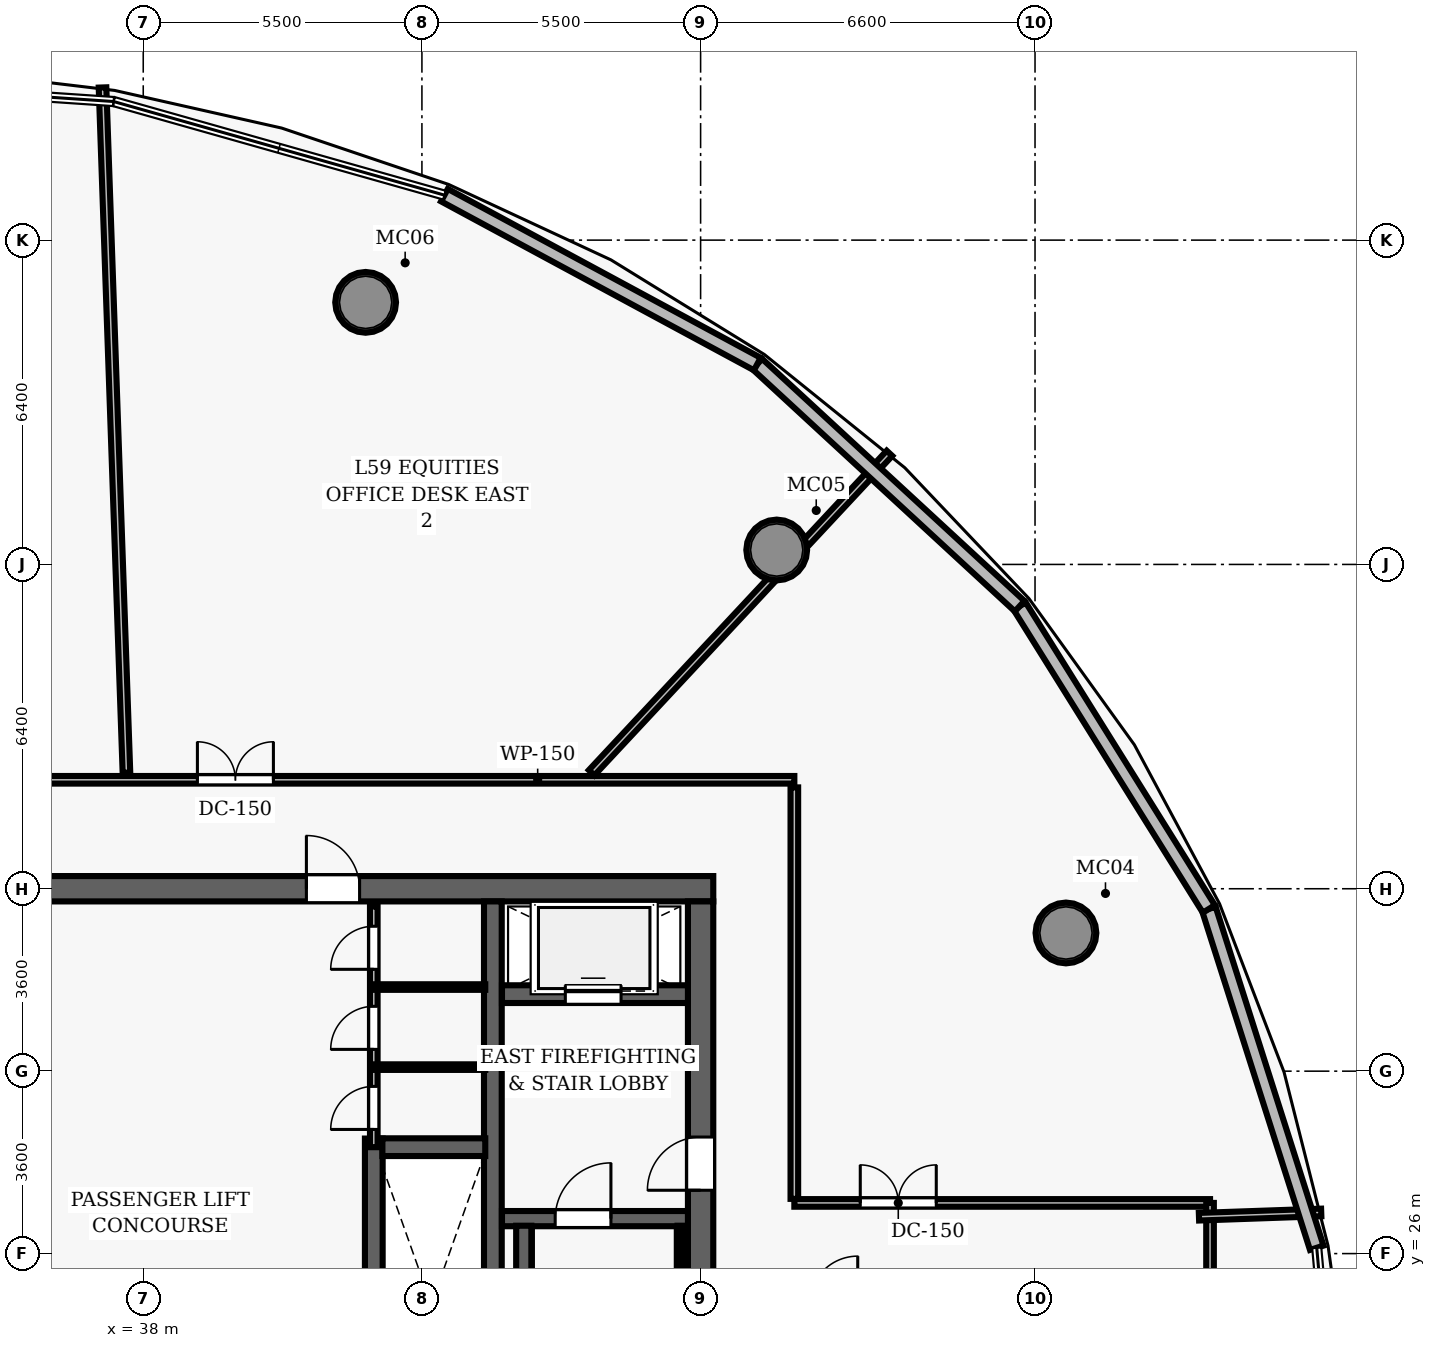
"""IFC4 building model, lengths in metres.
Left out: names, types, materials, properties, quantities, classifications, styles, units other than length and angle.
Written with IfcOpenShell. Run it as: python <this file> out.ifc"""

import sys

from ifc_helpers import new_model, si_unit, direction, frame, frame_2d, origin, origin_2d, place, context, subcontext, project, spatial, rectangle, hollow_circle, extrude, element, fill, save


model = new_model("IFC4")
c1 = context("Model", 3, precision=1e-05, world=origin(), true_north=direction((0.0, 1.0)))
c2 = subcontext(c1, "Body", "Model", "MODEL_VIEW")
j1 = project(units=[si_unit("LENGTHUNIT", "METRE"), si_unit("PLANEANGLEUNIT", "RADIAN")], contexts=[c1])
p1 = place(None, origin())
s1 = spatial("IfcSite", under=j1, at=p1, CompositionType="ELEMENT")
p2 = place(p1, origin())
s2 = spatial("IfcBuilding", under=s1, at=p2, CompositionType="ELEMENT")
p3 = place(p2, frame((0.0, 0.0, 232.8)))
s3 = spatial("IfcBuildingStorey", under=s2, at=p3, CompositionType="ELEMENT", Elevation=232.8)
p4 = place(p3, frame((26.75, 33.2, 0.0), z_axis=(0.0, 0.0, 1.0), x_axis=(1.0, 0.0, 0.0)))
e1 = element("IfcWall", 1, at=p4, inside=s3, PredefinedType="SHEAR", context=c2, shape_type="SweptSolid", body=[
    extrude(rectangle(XDim=22.5, YDim=0.5, at=frame_2d((11.25, 0.0))), origin(), (0.0, 0.0, 1.0), 3.85),
])
p5 = place(p4, frame((4.57, 0.0, 0.0)))
e2 = element("IfcOpeningElement", 2, at=p5, cuts=e1, PredefinedType="OPENING", context=c2, shape_type="SweptSolid", body=[
    extrude(rectangle(XDim=1.05, YDim=2.15, at=frame_2d((0.525, 1.075))), frame((0.0, 0.26, 0.0), z_axis=(0.0, -1.0, 0.0), x_axis=(1.0, 0.0, 0.0)), (0.0, 0.0, 1.0), 0.52),
])
p6 = place(p4, frame((14.47, 0.0, 0.0)))
e3 = element("IfcOpeningElement", 3, at=p6, cuts=e1, PredefinedType="OPENING", context=c2, shape_type="SweptSolid", body=[
    extrude(rectangle(XDim=1.05, YDim=2.15, at=frame_2d((0.525, 1.075))), frame((0.0, 0.26, 0.0), z_axis=(0.0, -1.0, 0.0), x_axis=(1.0, 0.0, 0.0)), (0.0, 0.0, 1.0), 0.52),
])
p7 = place(p3, frame((49.0, 19.05, 0.0), z_axis=(0.0, 0.0, 1.0), x_axis=(0.0, 1.0, 0.0)))
e4 = element("IfcWall", 4, at=p7, inside=s3, PredefinedType="SHEAR", context=c2, shape_type="SweptSolid", body=[
    extrude(rectangle(XDim=13.9, YDim=0.5, at=frame_2d((6.95, 0.0))), origin(), (0.0, 0.0, 1.0), 3.85),
])
p8 = place(p7, frame((8.2, 0.0, 0.0)))
e5 = element("IfcOpeningElement", 5, at=p8, cuts=e4, PredefinedType="OPENING", context=c2, shape_type="SweptSolid", body=[
    extrude(rectangle(XDim=1.05, YDim=2.15, at=frame_2d((0.525, 1.075))), frame((0.0, 0.26, 0.0), z_axis=(0.0, -1.0, 0.0), x_axis=(1.0, 0.0, 0.0)), (0.0, 0.0, 1.0), 0.52),
])
p9 = place(p3, frame((44.9, 19.05, 0.0), z_axis=(0.0, 0.0, 1.0), x_axis=(0.0, 1.0, 0.0)))
e6 = element("IfcWall", 6, at=p9, inside=s3, PredefinedType="SHEAR", context=c2, shape_type="SweptSolid", body=[
    extrude(rectangle(XDim=13.9, YDim=0.35, at=frame_2d((6.95, 0.0))), origin(), (0.0, 0.0, 1.0), 3.85),
])
for number, where, z_axis, x_axis in (
    (7, (56.21, 32.327, 0.0), (0.0, 0.0, 1.0), (1.0, 0.0, 0.0)),
    (8, (50.502, 39.885, 0.0), (0.0, 0.0, 1.0), (1.0, 0.0, 0.0)),
    (9, (42.389, 44.772, 0.0), (0.0, 0.0, 1.0), (1.0, 0.0, 0.0)),
):
    element("IfcColumn", number, at=place(p3, frame(where, z_axis=z_axis, x_axis=x_axis)), inside=s3, PredefinedType="COLUMN", context=c2, shape_type="SweptSolid", body=[
        extrude(hollow_circle(Radius=0.6, WallThickness=0.05, at=origin_2d()), origin(), (0.0, 0.0, 1.0), 3.85),
    ])
p10 = place(p3, frame((45.08, 26.69, 0.0), z_axis=(0.0, 0.0, 1.0), x_axis=(1.0, 0.0, 0.0)))
e10 = element("IfcWall", 10, at=p10, inside=s3, PredefinedType="SHEAR", context=c2, shape_type="SweptSolid", body=[
    extrude(rectangle(XDim=3.67, YDim=0.3, at=frame_2d((1.835, 0.0))), origin(), (0.0, 0.0, 1.0), 3.85),
])
p11 = place(p10, frame((1.05, 0.0, 0.0)))
e11 = element("IfcOpeningElement", 11, at=p11, cuts=e10, PredefinedType="OPENING", context=c2, shape_type="SweptSolid", body=[
    extrude(rectangle(XDim=1.1, YDim=2.15, at=frame_2d((0.55, 1.075))), frame((0.0, 0.16, 0.0), z_axis=(0.0, -1.0, 0.0), x_axis=(1.0, 0.0, 0.0)), (0.0, 0.0, 1.0), 0.32),
])
p12 = place(p3, frame((45.51, 19.05, 0.0), z_axis=(0.0, 0.0, 1.0), x_axis=(0.0, 1.0, 0.0)))
e12 = element("IfcWall", 12, at=p12, inside=s3, PredefinedType="SHEAR", context=c2, shape_type="SweptSolid", body=[
    extrude(rectangle(XDim=7.5, YDim=0.3, at=frame_2d((3.75, 0.0))), origin(), (0.0, 0.0, 1.0), 3.85),
])
p13 = place(p3, frame((48.605, 19.1, 0.0), z_axis=(0.0, 0.0, 1.0), x_axis=(0.0, 1.0, 0.0)))
e13 = element("IfcWall", 13, at=p13, inside=s3, PredefinedType="SHEAR", context=c2, shape_type="SweptSolid", body=[
    extrude(rectangle(XDim=7.45, YDim=0.12, at=frame_2d((3.725, 0.0))), origin(), (0.0, 0.0, 1.0), 3.85),
])
p14 = place(p3, frame((45.08, 31.12, 0.0), z_axis=(0.0, 0.0, 1.0), x_axis=(1.0, 0.0, 0.0)))
e14 = element("IfcWall", 14, at=p14, inside=s3, PredefinedType="SHEAR", context=c2, shape_type="SweptSolid", body=[
    extrude(rectangle(XDim=3.67, YDim=0.35, at=frame_2d((1.835, 0.0))), origin(), (0.0, 0.0, 1.0), 2.915),
])
p15 = place(p14, frame((1.25, 0.0, 0.0)))
e15 = element("IfcOpeningElement", 15, at=p15, cuts=e14, PredefinedType="OPENING", context=c2, shape_type="SweptSolid", body=[
    extrude(rectangle(XDim=1.1, YDim=2.15, at=frame_2d((0.55, 1.075))), frame((0.0, 0.185, 0.0), z_axis=(0.0, -1.0, 0.0), x_axis=(1.0, 0.0, 0.0)), (0.0, 0.0, 1.0), 0.37),
])
p16 = place(p3, frame((42.55, 21.73, 0.0), z_axis=(0.0, 0.0, 1.0), x_axis=(0.0, 1.0, 0.0)))
e16 = element("IfcWall", 16, at=p16, inside=s3, PredefinedType="SHEAR", context=c2, shape_type="SweptSolid", body=[
    extrude(rectangle(XDim=6.54, YDim=0.35, at=frame_2d((3.27, 0.0))), origin(), (0.0, 0.0, 1.0), 2.915),
])
p17 = place(p3, frame((42.72, 28.1, 0.0), z_axis=(0.0, 0.0, 1.0), x_axis=(1.0, 0.0, 0.0)))
e17 = element("IfcWall", 17, at=p17, inside=s3, PredefinedType="SHEAR", context=c2, shape_type="SweptSolid", body=[
    extrude(rectangle(XDim=2.03, YDim=0.35, at=frame_2d((1.015, 0.0))), origin(), (0.0, 0.0, 1.0), 2.915),
])
p18 = place(p3, frame((42.55, 28.1, 0.0), z_axis=(0.0, 0.0, 1.0), x_axis=(0.0, 1.0, 0.0)))
e18 = element("IfcWall", 18, at=p18, inside=s3, PredefinedType="PARTITIONING", context=c2, shape_type="SweptSolid", body=[
    extrude(rectangle(XDim=4.75, YDim=0.15, at=frame_2d((2.375, 0.0))), origin(), (0.0, 0.0, 1.0), 2.915),
])
p19 = place(p18, frame((0.35, 0.0, 0.0)))
e19 = element("IfcOpeningElement", 19, at=p19, cuts=e18, PredefinedType="OPENING", context=c2, shape_type="SweptSolid", body=[
    extrude(rectangle(XDim=0.85, YDim=2.1, at=frame_2d((0.425, 1.05))), frame((0.0, 0.085, 0.0), z_axis=(0.0, -1.0, 0.0), x_axis=(1.0, 0.0, 0.0)), (0.0, 0.0, 1.0), 0.17),
])
p20 = place(p18, frame((1.93, 0.0, 0.0)))
e20 = element("IfcOpeningElement", 20, at=p20, cuts=e18, PredefinedType="OPENING", context=c2, shape_type="SweptSolid", body=[
    extrude(rectangle(XDim=0.85, YDim=2.1, at=frame_2d((0.425, 1.05))), frame((0.0, 0.085, 0.0), z_axis=(0.0, -1.0, 0.0), x_axis=(1.0, 0.0, 0.0)), (0.0, 0.0, 1.0), 0.17),
])
p21 = place(p18, frame((3.51, 0.0, 0.0)))
e21 = element("IfcOpeningElement", 21, at=p21, cuts=e18, PredefinedType="OPENING", context=c2, shape_type="SweptSolid", body=[
    extrude(rectangle(XDim=0.85, YDim=2.1, at=frame_2d((0.425, 1.05))), frame((0.0, 0.085, 0.0), z_axis=(0.0, -1.0, 0.0), x_axis=(1.0, 0.0, 0.0)), (0.0, 0.0, 1.0), 0.17),
])
for number, where, z_axis, x_axis in (
    (22, (42.55, 29.68, 0.0), (0.0, 0.0, 1.0), (1.0, 0.0, 0.0)),
    (23, (42.55, 31.26, 0.0), (0.0, 0.0, 1.0), (1.0, 0.0, 0.0)),
):
    element("IfcWall", number, at=place(p3, frame(where, z_axis=z_axis, x_axis=x_axis)), inside=s3, PredefinedType="PARTITIONING", context=c2, shape_type="SweptSolid", body=[
        extrude(rectangle(XDim=2.2, YDim=0.11, at=frame_2d((1.1, 0.0))), origin(), (0.0, 0.0, 1.0), 2.915),
    ])
p22 = place(p3, frame((24.85, 35.35, 0.0), z_axis=(0.0, 0.0, 1.0), x_axis=(1.0, 0.0, 0.0)))
e24 = element("IfcWall", 24, at=p22, inside=s3, PredefinedType="PARTITIONING", context=c2, shape_type="SweptSolid", body=[
    extrude(rectangle(XDim=26.0, YDim=0.15, at=frame_2d((13.0, 0.0))), origin(), (0.0, 0.0, 1.0), 2.915),
])
p23 = place(p22, frame((14.219, 0.0, 0.0)))
e25 = element("IfcOpeningElement", 25, at=p23, cuts=e24, PredefinedType="OPENING", context=c2, shape_type="SweptSolid", body=[
    extrude(rectangle(XDim=1.5, YDim=2.2, at=frame_2d((0.75, 1.1))), frame((0.0, 0.085, 0.0), z_axis=(0.0, -1.0, 0.0), x_axis=(1.0, 0.0, 0.0)), (0.0, 0.0, 1.0), 0.17),
])
p24 = place(p22, frame((5.566, 0.0, 0.0)))
e26 = element("IfcOpeningElement", 26, at=p24, cuts=e24, PredefinedType="OPENING", context=c2, shape_type="SweptSolid", body=[
    extrude(rectangle(XDim=1.5, YDim=2.2, at=frame_2d((0.75, 1.1))), frame((0.0, 0.085, 0.0), z_axis=(0.0, -1.0, 0.0), x_axis=(1.0, 0.0, 0.0)), (0.0, 0.0, 1.0), 0.17),
])
p25 = place(p3, frame((50.85, 27.08, 0.0), z_axis=(0.0, 0.0, 1.0), x_axis=(0.0, 1.0, 0.0)))
e27 = element("IfcWall", 27, at=p25, inside=s3, PredefinedType="PARTITIONING", context=c2, shape_type="SweptSolid", body=[
    extrude(rectangle(XDim=8.12, YDim=0.15, at=frame_2d((4.06, 0.0))), origin(), (0.0, 0.0, 1.0), 2.915),
])
p26 = place(p3, frame((50.85, 27.0, 0.0), z_axis=(0.0, 0.0, 1.0), x_axis=(1.0, 0.0, 0.0)))
e28 = element("IfcWall", 28, at=p26, inside=s3, PredefinedType="PARTITIONING", context=c2, shape_type="SweptSolid", body=[
    extrude(rectangle(XDim=8.204, YDim=0.15, at=frame_2d((4.102, 0.0))), origin(), (0.0, 0.0, 1.0), 2.915),
])
p27 = place(p26, frame((1.301, 0.0, 0.0)))
e29 = element("IfcOpeningElement", 29, at=p27, cuts=e28, PredefinedType="OPENING", context=c2, shape_type="SweptSolid", body=[
    extrude(rectangle(XDim=1.5, YDim=2.2, at=frame_2d((0.75, 1.1))), frame((0.0, 0.085, 0.0), z_axis=(0.0, -1.0, 0.0), x_axis=(1.0, 0.0, 0.0)), (0.0, 0.0, 1.0), 0.17),
])
p28 = place(p3, frame((59.054, 25.0, 0.0), z_axis=(0.0, 0.0, 1.0), x_axis=(0.0, 1.0, 0.0)))
e30 = element("IfcWall", 30, at=p28, inside=s3, PredefinedType="PARTITIONING", context=c2, shape_type="SweptSolid", body=[
    extrude(rectangle(XDim=2.0, YDim=0.15, at=frame_2d((1.0, 0.0))), origin(), (0.0, 0.0, 1.0), 2.915),
])
p29 = place(p3, frame((58.835, 26.728, 0.0), z_axis=(0.0, 0.0, 1.0), x_axis=(0.999387726296, 0.034988177001, 0.0)))
e31 = element("IfcWall", 31, at=p29, inside=s3, PredefinedType="PARTITIONING", context=c2, shape_type="SweptSolid", body=[
    extrude(rectangle(XDim=2.414, YDim=0.15, at=frame_2d((1.207, 0.0))), origin(), (0.0, 0.0, 1.0), 2.915),
])
p30 = place(p3, frame((46.85, 35.49, 0.0), z_axis=(0.0, 0.0, 1.0), x_axis=(0.68198814017, 0.731363231689, 0.0)))
e32 = element("IfcWall", 32, at=p30, inside=s3, PredefinedType="PARTITIONING", context=c2, shape_type="SweptSolid", body=[
    extrude(rectangle(XDim=8.618, YDim=0.15, at=frame_2d((4.309, 0.0))), origin(), (0.0, 0.0, 1.0), 2.915),
])
p31 = place(p3, frame((37.669, 35.49, 0.0), z_axis=(0.0, 0.0, 1.0), x_axis=(-0.034913436029, 0.99939034015, 0.0)))
e33 = element("IfcWall", 33, at=p31, inside=s3, PredefinedType="PARTITIONING", context=c2, shape_type="SweptSolid", body=[
    extrude(rectangle(XDim=13.531, YDim=0.15, at=frame_2d((6.766, 0.0))), origin(), (0.0, 0.0, 1.0), 2.915),
])
p32 = place(p3, frame((59.031, 32.802, 0.0), z_axis=(0.0, 0.0, 1.0), x_axis=(0.303361607716, -0.952875508639, 0.0)))
e34 = element("IfcWall", 34, at=p32, inside=s3, PredefinedType="SOLIDWALL", context=c2, shape_type="SweptSolid", body=[
    extrude(rectangle(XDim=7.018, YDim=0.28, at=frame_2d((3.509, 0.0))), origin(), (0.0, 0.0, 1.0), 3.5),
])
p33 = place(p3, frame((55.297, 38.776, 0.0), z_axis=(0.0, 0.0, 1.0), x_axis=(0.529974021184, -0.848013877758, 0.0)))
e35 = element("IfcWall", 35, at=p33, inside=s3, PredefinedType="SOLIDWALL", context=c2, shape_type="SweptSolid", body=[
    extrude(rectangle(XDim=7.045, YDim=0.28, at=frame_2d((3.523, 0.0))), origin(), (0.0, 0.0, 1.0), 3.5),
])
p34 = place(p3, frame((50.119, 43.555, 0.0), z_axis=(0.0, 0.0, 1.0), x_axis=(0.734865878673, -0.678212459604, 0.0)))
e36 = element("IfcWall", 36, at=p34, inside=s3, PredefinedType="SOLIDWALL", context=c2, shape_type="SweptSolid", body=[
    extrude(rectangle(XDim=7.046, YDim=0.28, at=frame_2d((3.523, 0.0))), origin(), (0.0, 0.0, 1.0), 3.5),
])
p35 = place(p3, frame((43.944, 46.888, 0.0), z_axis=(0.0, 0.0, 1.0), x_axis=(0.879989165457, -0.474993756463, 0.0)))
e37 = element("IfcWall", 37, at=p35, inside=s3, PredefinedType="SOLIDWALL", context=c2, shape_type="SweptSolid", body=[
    extrude(rectangle(XDim=7.018, YDim=0.28, at=frame_2d((3.509, 0.0))), origin(), (0.0, 0.0, 1.0), 3.5),
])
p36 = place(p11, origin())
e38 = element("IfcDoor", 38, at=p36, inside=s3, OperationType="SINGLE_SWING_RIGHT", PredefinedType="DOOR", context=c2, shape_type="SweptSolid", body=[
    extrude(rectangle(XDim=1.1, YDim=2.15, at=frame_2d((0.55, 1.075))), frame((0.0, 0.025, 0.0), z_axis=(0.0, -1.0, 0.0), x_axis=(1.0, 0.0, 0.0)), (0.0, 0.0, 1.0), 0.05),
])
fill(e11, e38)
p37 = place(p8, origin())
e39 = element("IfcDoor", 39, at=p37, inside=s3, OperationType="SINGLE_SWING_LEFT", PredefinedType="DOOR", context=c2, shape_type="SweptSolid", body=[
    extrude(rectangle(XDim=1.05, YDim=2.15, at=frame_2d((0.525, 1.075))), frame((0.0, 0.025, 0.0), z_axis=(0.0, -1.0, 0.0), x_axis=(1.0, 0.0, 0.0)), (0.0, 0.0, 1.0), 0.05),
])
fill(e5, e39)
p38 = place(p6, origin())
e40 = element("IfcDoor", 40, at=p38, inside=s3, OperationType="SINGLE_SWING_LEFT", PredefinedType="DOOR", context=c2, shape_type="SweptSolid", body=[
    extrude(rectangle(XDim=1.05, YDim=2.15, at=frame_2d((0.525, 1.075))), frame((0.0, 0.025, 0.0), z_axis=(0.0, -1.0, 0.0), x_axis=(1.0, 0.0, 0.0)), (0.0, 0.0, 1.0), 0.05),
])
fill(e3, e40)
p39 = place(p19, origin())
e41 = element("IfcDoor", 41, at=p39, inside=s3, OperationType="SINGLE_SWING_LEFT", PredefinedType="DOOR", context=c2, shape_type="SweptSolid", body=[
    extrude(rectangle(XDim=0.85, YDim=2.1, at=frame_2d((0.425, 1.05))), frame((0.0, 0.025, 0.0), z_axis=(0.0, -1.0, 0.0), x_axis=(1.0, 0.0, 0.0)), (0.0, 0.0, 1.0), 0.05),
])
fill(e19, e41)
p40 = place(p20, origin())
e42 = element("IfcDoor", 42, at=p40, inside=s3, OperationType="SINGLE_SWING_LEFT", PredefinedType="DOOR", context=c2, shape_type="SweptSolid", body=[
    extrude(rectangle(XDim=0.85, YDim=2.1, at=frame_2d((0.425, 1.05))), frame((0.0, 0.025, 0.0), z_axis=(0.0, -1.0, 0.0), x_axis=(1.0, 0.0, 0.0)), (0.0, 0.0, 1.0), 0.05),
])
fill(e20, e42)
p41 = place(p21, origin())
e43 = element("IfcDoor", 43, at=p41, inside=s3, OperationType="SINGLE_SWING_LEFT", PredefinedType="DOOR", context=c2, shape_type="SweptSolid", body=[
    extrude(rectangle(XDim=0.85, YDim=2.1, at=frame_2d((0.425, 1.05))), frame((0.0, 0.025, 0.0), z_axis=(0.0, -1.0, 0.0), x_axis=(1.0, 0.0, 0.0)), (0.0, 0.0, 1.0), 0.05),
])
fill(e21, e43)
p42 = place(p27, origin())
e44 = element("IfcDoor", 44, at=p42, inside=s3, OperationType="DOUBLE_DOOR_SINGLE_SWING", PredefinedType="DOOR", context=c2, shape_type="SweptSolid", body=[
    extrude(rectangle(XDim=1.5, YDim=2.2, at=frame_2d((0.75, 1.1))), frame((0.0, 0.025, 0.0), z_axis=(0.0, -1.0, 0.0), x_axis=(1.0, 0.0, 0.0)), (0.0, 0.0, 1.0), 0.05),
])
fill(e29, e44)
p43 = place(p23, origin())
e45 = element("IfcDoor", 45, at=p43, inside=s3, OperationType="DOUBLE_DOOR_SINGLE_SWING", PredefinedType="DOOR", context=c2, shape_type="SweptSolid", body=[
    extrude(rectangle(XDim=1.5, YDim=2.2, at=frame_2d((0.75, 1.1))), frame((0.0, 0.025, 0.0), z_axis=(0.0, -1.0, 0.0), x_axis=(1.0, 0.0, 0.0)), (0.0, 0.0, 1.0), 0.05),
])
fill(e25, e45)
p44 = place(p15, origin())
e46 = element("IfcDoor", 46, at=p44, inside=s3, OperationType="SLIDING_TO_LEFT", PredefinedType="DOOR", context=c2, shape_type="SweptSolid", body=[
    extrude(rectangle(XDim=1.1, YDim=2.15, at=frame_2d((0.55, 1.075))), frame((0.0, 0.025, 0.0), z_axis=(0.0, -1.0, 0.0), x_axis=(1.0, 0.0, 0.0)), (0.0, 0.0, 1.0), 0.05),
])
fill(e15, e46)
save(model, sys.argv[1])
